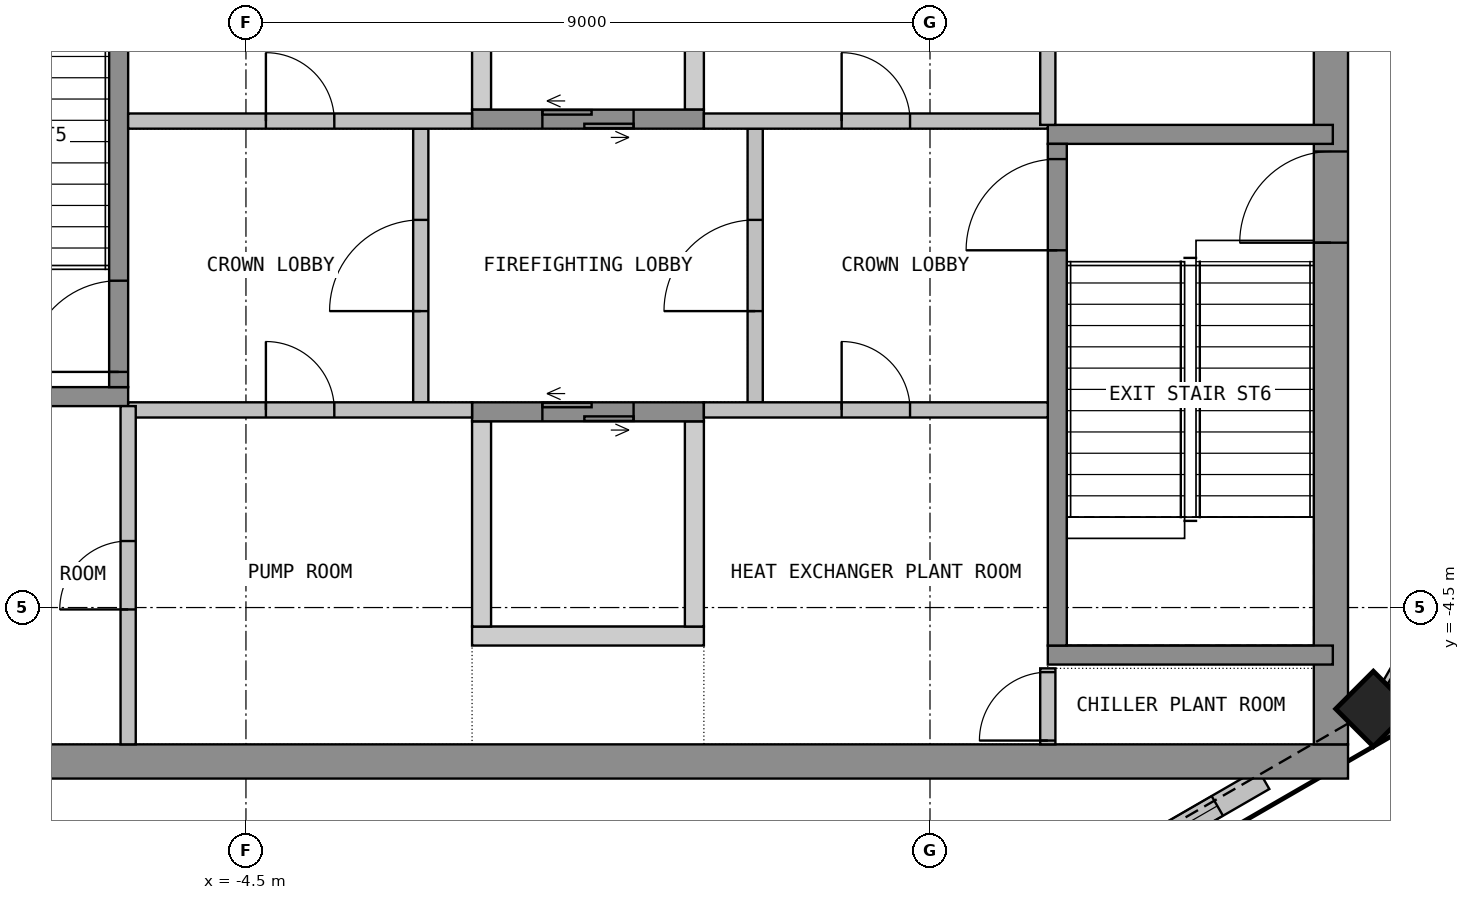
"""IFC4 building model, lengths in metres.
Left out: names, types, materials, properties, quantities, classifications, styles, units other than length and angle.
Written with IfcOpenShell. Run it as: python <this file> out.ifc"""

import sys

from ifc_helpers import new_model, si_unit, direction, frame, frame_2d, origin, origin_2d, place, context, subcontext, project, spatial, polyline, rectangle, outline, extrude, element, fill, save


model = new_model("IFC4")
c1 = context("Model", 3, precision=1e-05, world=origin(), true_north=direction((0.0, 1.0)))
c2 = subcontext(c1, "Body", "Model", "MODEL_VIEW")
j1 = project(units=[si_unit("LENGTHUNIT", "METRE"), si_unit("PLANEANGLEUNIT", "RADIAN")], contexts=[c1])
p1 = place(None, origin())
s1 = spatial("IfcSite", under=j1, at=p1, CompositionType="ELEMENT")
p2 = place(p1, origin())
s2 = spatial("IfcBuilding", under=s1, at=p2, CompositionType="ELEMENT")
p3 = place(p2, frame((0.0, 0.0, 336.9)))
s3 = spatial("IfcBuildingStorey", under=s2, at=p3, CompositionType="ELEMENT", Elevation=336.9)
p4 = place(p3, frame((10.333, -5.833, 0.0), z_axis=(0.0, 0.0, 1.0), x_axis=(0.707106781187, 0.707106781187, 0.0)))
e1 = element("IfcColumn", 1, at=p4, inside=s3, PredefinedType="COLUMN", context=c2, shape_type="SweptSolid", body=[
    extrude(rectangle(XDim=0.7, YDim=0.7, at=origin_2d()), origin(), (0.0, 0.0, 1.0), 3.9),
])
p5 = place(p3, frame((7.005, -7.846, 0.0), z_axis=(0.0, 0.0, 1.0), x_axis=(0.866060442015, 0.499939307093, 0.0)))
e2 = element("IfcWall", 2, at=p5, inside=s3, PredefinedType="SOLIDWALL", context=c2, shape_type="SweptSolid", body=[
    extrude(rectangle(XDim=2.177, YDim=0.3, at=frame_2d((1.088, 0.0))), origin(), (0.0, 0.0, 1.0), 3.0),
])
p6 = place(p5, frame((0.173, 0.0, 0.6)))
e3 = element("IfcOpeningElement", 3, at=p6, cuts=e2, PredefinedType="OPENING", context=c2, shape_type="SweptSolid", body=[
    extrude(rectangle(XDim=1.3, YDim=2.3, at=frame_2d((0.65, 1.15))), frame((0.0, 0.16, 0.0), z_axis=(0.0, -1.0, 0.0), x_axis=(1.0, 0.0, 0.0)), (0.0, 0.0, 1.0), 0.32),
])
p7 = place(p3, frame((10.592, -5.542, 0.0), z_axis=(0.0, 0.0, 1.0), x_axis=(0.499987607361, 0.86603255856, 0.0)))
e4 = element("IfcWall", 4, at=p7, inside=s3, PredefinedType="SOLIDWALL", context=c2, shape_type="SweptSolid", body=[
    extrude(rectangle(XDim=3.507, YDim=0.3, at=frame_2d((1.753, 0.0))), origin(), (0.0, 0.0, 1.0), 3.0),
])
p8 = place(p7, frame((0.553, 0.0, 0.6)))
e5 = element("IfcOpeningElement", 5, at=p8, cuts=e4, PredefinedType="OPENING", context=c2, shape_type="SweptSolid", body=[
    extrude(rectangle(XDim=2.4, YDim=2.3, at=frame_2d((1.2, 1.15))), frame((0.0, 0.16, 0.0), z_axis=(0.0, -1.0, 0.0), x_axis=(1.0, 0.0, 0.0)), (0.0, 0.0, 1.0), 0.32),
])
p9 = place(p3, frame((12.346, 2.505, 0.0), z_axis=(0.0, 0.0, 1.0), x_axis=(-0.499987607361, 0.86603255856, 0.0)))
e6 = element("IfcWall", 6, at=p9, inside=s3, PredefinedType="SOLIDWALL", context=c2, shape_type="SweptSolid", body=[
    extrude(rectangle(XDim=3.507, YDim=0.3, at=frame_2d((1.753, 0.0))), origin(), (0.0, 0.0, 1.0), 3.0),
])
p10 = place(p9, frame((0.553, 0.0, 0.6)))
e7 = element("IfcOpeningElement", 7, at=p10, cuts=e6, PredefinedType="OPENING", context=c2, shape_type="SweptSolid", body=[
    extrude(rectangle(XDim=2.4, YDim=2.3, at=frame_2d((1.2, 1.15))), frame((0.0, 0.16, 0.0), z_axis=(0.0, -1.0, 0.0), x_axis=(1.0, 0.0, 0.0)), (0.0, 0.0, 1.0), 0.32),
])
p11 = place(p3, frame((-8.89, -6.758, 0.0), z_axis=(0.0, 0.0, 1.0), x_axis=(0.866060442015, -0.499939307093, 0.0)))
e8 = element("IfcWall", 8, at=p11, inside=s3, PredefinedType="SOLIDWALL", context=c2, shape_type="SweptSolid", body=[
    extrude(rectangle(XDim=2.177, YDim=0.3, at=frame_2d((1.088, 0.0))), origin(), (0.0, 0.0, 1.0), 3.0),
])
p12 = place(p11, frame((0.704, 0.0, 0.6)))
e9 = element("IfcOpeningElement", 9, at=p12, cuts=e8, PredefinedType="OPENING", context=c2, shape_type="SweptSolid", body=[
    extrude(rectangle(XDim=1.3, YDim=2.3, at=frame_2d((0.65, 1.15))), frame((0.0, 0.16, 0.0), z_axis=(0.0, -1.0, 0.0), x_axis=(1.0, 0.0, 0.0)), (0.0, 0.0, 1.0), 0.32),
])
p13 = place(p3, frame((-10.0, -6.525, 0.0), z_axis=(0.0, 0.0, 1.0), x_axis=(1.0, 0.0, 0.0)))
e10 = element("IfcWall", 10, at=p13, inside=s3, PredefinedType="SHEAR", context=c2, shape_type="SweptSolid", body=[
    extrude(rectangle(XDim=20.0, YDim=0.45, at=frame_2d((10.0, 0.0))), origin(), (0.0, 0.0, 1.0), 3.9),
])
p14 = place(p3, frame((9.775, -6.3, 0.0), z_axis=(0.0, 0.0, 1.0), x_axis=(0.0, 1.0, 0.0)))
e11 = element("IfcWall", 11, at=p14, inside=s3, PredefinedType="SHEAR", context=c2, shape_type="SweptSolid", body=[
    extrude(rectangle(XDim=12.6, YDim=0.45, at=frame_2d((6.3, 0.0))), origin(), (0.0, 0.0, 1.0), 3.9),
])
p15 = place(p14, frame((6.6, 0.0, 0.0)))
e12 = element("IfcOpeningElement", 12, at=p15, cuts=e11, PredefinedType="OPENING", context=c2, shape_type="SweptSolid", body=[
    extrude(rectangle(XDim=1.2, YDim=2.1, at=frame_2d((0.6, 1.05))), frame((0.0, 0.235, 0.0), z_axis=(0.0, -1.0, 0.0), x_axis=(1.0, 0.0, 0.0)), (0.0, 0.0, 1.0), 0.47),
])
p16 = place(p3, origin())
e13 = element("IfcWall", 13, at=p16, inside=s3, PredefinedType="SHEAR", context=c2, shape_type="SweptSolid", body=[
    extrude(outline(polyline([(-1.525, 2.05), (-1.275, 2.05), (-1.275, 4.75), (-1.525, 4.75), (-1.525, 2.05)])), origin(), (0.0, 0.0, 1.0), 3.9),
])
p17 = place(p3, origin())
e14 = element("IfcWall", 14, at=p17, inside=s3, PredefinedType="SHEAR", context=c2, shape_type="SweptSolid", body=[
    extrude(outline(polyline([(1.275, 2.05), (1.525, 2.05), (1.525, 4.75), (1.275, 4.75), (1.275, 2.05)])), origin(), (0.0, 0.0, 1.0), 3.9),
])
p18 = place(p3, frame((-1.525, 1.925, 0.0), z_axis=(0.0, 0.0, 1.0), x_axis=(1.0, 0.0, 0.0)))
e15 = element("IfcWall", 15, at=p18, inside=s3, PredefinedType="SHEAR", context=c2, shape_type="SweptSolid", body=[
    extrude(rectangle(XDim=3.05, YDim=0.25, at=frame_2d((1.525, 0.0))), origin(), (0.0, 0.0, 1.0), 3.9),
])
p19 = place(p18, frame((0.925, 0.0, 0.0)))
e16 = element("IfcOpeningElement", 16, at=p19, cuts=e15, PredefinedType="OPENING", context=c2, shape_type="SweptSolid", body=[
    extrude(rectangle(XDim=1.2, YDim=2.1, at=frame_2d((0.6, 1.05))), frame((0.0, 0.135, 0.0), z_axis=(0.0, -1.0, 0.0), x_axis=(1.0, 0.0, 0.0)), (0.0, 0.0, 1.0), 0.27),
])
p20 = place(p3, origin())
e17 = element("IfcWall", 17, at=p20, inside=s3, PredefinedType="SHEAR", context=c2, shape_type="SweptSolid", body=[
    extrude(outline(polyline([(-1.525, -5.0), (1.525, -5.0), (1.525, -4.75), (-1.525, -4.75), (-1.525, -5.0)])), origin(), (0.0, 0.0, 1.0), 3.9),
])
p21 = place(p3, origin())
e18 = element("IfcWall", 18, at=p21, inside=s3, PredefinedType="SHEAR", context=c2, shape_type="SweptSolid", body=[
    extrude(outline(polyline([(-1.525, -4.75), (-1.275, -4.75), (-1.275, -2.05), (-1.525, -2.05), (-1.525, -4.75)])), origin(), (0.0, 0.0, 1.0), 3.9),
])
p22 = place(p3, origin())
e19 = element("IfcWall", 19, at=p22, inside=s3, PredefinedType="SHEAR", context=c2, shape_type="SweptSolid", body=[
    extrude(outline(polyline([(1.275, -4.75), (1.525, -4.75), (1.525, -2.05), (1.275, -2.05), (1.275, -4.75)])), origin(), (0.0, 0.0, 1.0), 3.9),
])
p23 = place(p3, frame((-1.525, -1.925, 0.0), z_axis=(0.0, 0.0, 1.0), x_axis=(1.0, 0.0, 0.0)))
e20 = element("IfcWall", 20, at=p23, inside=s3, PredefinedType="SHEAR", context=c2, shape_type="SweptSolid", body=[
    extrude(rectangle(XDim=3.05, YDim=0.25, at=frame_2d((1.525, 0.0))), origin(), (0.0, 0.0, 1.0), 3.9),
])
p24 = place(p23, frame((0.925, 0.0, 0.0)))
e21 = element("IfcOpeningElement", 21, at=p24, cuts=e20, PredefinedType="OPENING", context=c2, shape_type="SweptSolid", body=[
    extrude(rectangle(XDim=1.2, YDim=2.1, at=frame_2d((0.6, 1.05))), frame((0.0, 0.135, 0.0), z_axis=(0.0, -1.0, 0.0), x_axis=(1.0, 0.0, 0.0)), (0.0, 0.0, 1.0), 0.27),
])
p25 = place(p3, frame((-2.2, -1.8, 0.0), z_axis=(0.0, 0.0, 1.0), x_axis=(0.0, 1.0, 0.0)))
e22 = element("IfcWall", 22, at=p25, inside=s3, PredefinedType="PARTITIONING", context=c2, shape_type="SweptSolid", body=[
    extrude(rectangle(XDim=3.6, YDim=0.2, at=frame_2d((1.8, 0.0))), origin(), (0.0, 0.0, 1.0), 3.9),
])
p26 = place(p25, frame((1.2, 0.0, 0.0)))
e23 = element("IfcOpeningElement", 23, at=p26, cuts=e22, PredefinedType="OPENING", context=c2, shape_type="SweptSolid", body=[
    extrude(rectangle(XDim=1.2, YDim=2.1, at=frame_2d((0.6, 1.05))), frame((0.0, 0.11, 0.0), z_axis=(0.0, -1.0, 0.0), x_axis=(1.0, 0.0, 0.0)), (0.0, 0.0, 1.0), 0.22),
])
p27 = place(p3, frame((2.2, -1.8, 0.0), z_axis=(0.0, 0.0, 1.0), x_axis=(0.0, 1.0, 0.0)))
e24 = element("IfcWall", 24, at=p27, inside=s3, PredefinedType="PARTITIONING", context=c2, shape_type="SweptSolid", body=[
    extrude(rectangle(XDim=3.6, YDim=0.2, at=frame_2d((1.8, 0.0))), origin(), (0.0, 0.0, 1.0), 3.9),
])
p28 = place(p27, frame((1.2, 0.0, 0.0)))
e25 = element("IfcOpeningElement", 25, at=p28, cuts=e24, PredefinedType="OPENING", context=c2, shape_type="SweptSolid", body=[
    extrude(rectangle(XDim=1.2, YDim=2.1, at=frame_2d((0.6, 1.05))), frame((0.0, 0.11, 0.0), z_axis=(0.0, -1.0, 0.0), x_axis=(1.0, 0.0, 0.0)), (0.0, 0.0, 1.0), 0.22),
])
p29 = place(p3, frame((-9.8, -1.725, 0.0), z_axis=(0.0, 0.0, 1.0), x_axis=(1.0, 0.0, 0.0)))
e26 = element("IfcWall", 26, at=p29, inside=s3, PredefinedType="SHEAR", context=c2, shape_type="SweptSolid", body=[
    extrude(rectangle(XDim=3.75, YDim=0.25, at=frame_2d((1.875, 0.0))), origin(), (0.0, 0.0, 1.0), 3.9),
])
p30 = place(p3, frame((-6.175, -1.6, 0.0), z_axis=(0.0, 0.0, 1.0), x_axis=(0.0, 1.0, 0.0)))
e27 = element("IfcWall", 27, at=p30, inside=s3, PredefinedType="SHEAR", context=c2, shape_type="SweptSolid", body=[
    extrude(rectangle(XDim=6.6, YDim=0.25, at=frame_2d((3.3, 0.0))), origin(), (0.0, 0.0, 1.0), 3.9),
])
p31 = place(p30, frame((0.2, 0.0, 0.0)))
e28 = element("IfcOpeningElement", 28, at=p31, cuts=e27, PredefinedType="OPENING", context=c2, shape_type="SweptSolid", body=[
    extrude(rectangle(XDim=1.2, YDim=2.1, at=frame_2d((0.6, 1.05))), frame((0.0, 0.135, 0.0), z_axis=(0.0, -1.0, 0.0), x_axis=(1.0, 0.0, 0.0)), (0.0, 0.0, 1.0), 0.27),
])
for number, where, z_axis, x_axis in (
    (29, (6.05, -5.125, 0.0), (0.0, 0.0, 1.0), (1.0, 0.0, 0.0)),
    (30, (6.05, 1.725, 0.0), (0.0, 0.0, 1.0), (1.0, 0.0, 0.0)),
):
    element("IfcWall", number, at=place(p3, frame(where, z_axis=z_axis, x_axis=x_axis)), inside=s3, PredefinedType="SHEAR", context=c2, shape_type="SweptSolid", body=[
        extrude(rectangle(XDim=3.75, YDim=0.25, at=frame_2d((1.875, 0.0))), origin(), (0.0, 0.0, 1.0), 3.9),
    ])
p32 = place(p3, frame((6.175, -5.0, 0.0), z_axis=(0.0, 0.0, 1.0), x_axis=(0.0, 1.0, 0.0)))
e31 = element("IfcWall", 31, at=p32, inside=s3, PredefinedType="SHEAR", context=c2, shape_type="SweptSolid", body=[
    extrude(rectangle(XDim=6.6, YDim=0.25, at=frame_2d((3.3, 0.0))), origin(), (0.0, 0.0, 1.0), 3.9),
])
p33 = place(p32, frame((5.2, 0.0, 0.0)))
e32 = element("IfcOpeningElement", 32, at=p33, cuts=e31, PredefinedType="OPENING", context=c2, shape_type="SweptSolid", body=[
    extrude(rectangle(XDim=1.2, YDim=2.1, at=frame_2d((0.6, 1.05))), frame((0.0, 0.135, 0.0), z_axis=(0.0, -1.0, 0.0), x_axis=(1.0, 0.0, 0.0)), (0.0, 0.0, 1.0), 0.27),
])
p34 = place(p3, frame((-6.05, 1.9, 0.0), z_axis=(0.0, 0.0, 1.0), x_axis=(1.0, 0.0, 0.0)))
e33 = element("IfcWall", 33, at=p34, inside=s3, PredefinedType="PARTITIONING", context=c2, shape_type="SweptSolid", body=[
    extrude(rectangle(XDim=4.525, YDim=0.2, at=frame_2d((2.263, 0.0))), origin(), (0.0, 0.0, 1.0), 3.9),
])
p35 = place(p34, frame((1.812, 0.0, 0.0)))
e34 = element("IfcOpeningElement", 34, at=p35, cuts=e33, PredefinedType="OPENING", context=c2, shape_type="SweptSolid", body=[
    extrude(rectangle(XDim=0.9, YDim=2.1, at=frame_2d((0.45, 1.05))), frame((0.0, 0.11, 0.0), z_axis=(0.0, -1.0, 0.0), x_axis=(1.0, 0.0, 0.0)), (0.0, 0.0, 1.0), 0.22),
])
p36 = place(p3, frame((-6.05, -1.9, 0.0), z_axis=(0.0, 0.0, 1.0), x_axis=(1.0, 0.0, 0.0)))
e35 = element("IfcWall", 35, at=p36, inside=s3, PredefinedType="PARTITIONING", context=c2, shape_type="SweptSolid", body=[
    extrude(rectangle(XDim=4.525, YDim=0.2, at=frame_2d((2.263, 0.0))), origin(), (0.0, 0.0, 1.0), 3.9),
])
p37 = place(p36, frame((1.812, 0.0, 0.0)))
e36 = element("IfcOpeningElement", 36, at=p37, cuts=e35, PredefinedType="OPENING", context=c2, shape_type="SweptSolid", body=[
    extrude(rectangle(XDim=0.9, YDim=2.1, at=frame_2d((0.45, 1.05))), frame((0.0, 0.11, 0.0), z_axis=(0.0, -1.0, 0.0), x_axis=(1.0, 0.0, 0.0)), (0.0, 0.0, 1.0), 0.22),
])
p38 = place(p3, frame((1.525, 1.9, 0.0), z_axis=(0.0, 0.0, 1.0), x_axis=(1.0, 0.0, 0.0)))
e37 = element("IfcWall", 37, at=p38, inside=s3, PredefinedType="PARTITIONING", context=c2, shape_type="SweptSolid", body=[
    extrude(rectangle(XDim=4.525, YDim=0.2, at=frame_2d((2.263, 0.0))), origin(), (0.0, 0.0, 1.0), 3.9),
])
p39 = place(p38, frame((1.812, 0.0, 0.0)))
e38 = element("IfcOpeningElement", 38, at=p39, cuts=e37, PredefinedType="OPENING", context=c2, shape_type="SweptSolid", body=[
    extrude(rectangle(XDim=0.9, YDim=2.1, at=frame_2d((0.45, 1.05))), frame((0.0, 0.11, 0.0), z_axis=(0.0, -1.0, 0.0), x_axis=(1.0, 0.0, 0.0)), (0.0, 0.0, 1.0), 0.22),
])
p40 = place(p3, frame((1.525, -1.9, 0.0), z_axis=(0.0, 0.0, 1.0), x_axis=(1.0, 0.0, 0.0)))
e39 = element("IfcWall", 39, at=p40, inside=s3, PredefinedType="PARTITIONING", context=c2, shape_type="SweptSolid", body=[
    extrude(rectangle(XDim=4.525, YDim=0.2, at=frame_2d((2.263, 0.0))), origin(), (0.0, 0.0, 1.0), 3.9),
])
p41 = place(p40, frame((1.812, 0.0, 0.0)))
e40 = element("IfcOpeningElement", 40, at=p41, cuts=e39, PredefinedType="OPENING", context=c2, shape_type="SweptSolid", body=[
    extrude(rectangle(XDim=0.9, YDim=2.1, at=frame_2d((0.45, 1.05))), frame((0.0, 0.11, 0.0), z_axis=(0.0, -1.0, 0.0), x_axis=(1.0, 0.0, 0.0)), (0.0, 0.0, 1.0), 0.22),
])
p42 = place(p3, frame((-6.05, -6.3, 0.0), z_axis=(0.0, 0.0, 1.0), x_axis=(0.0, 1.0, 0.0)))
e41 = element("IfcWall", 41, at=p42, inside=s3, PredefinedType="PARTITIONING", context=c2, shape_type="SweptSolid", body=[
    extrude(rectangle(XDim=4.45, YDim=0.2, at=frame_2d((2.225, 0.0))), origin(), (0.0, 0.0, 1.0), 3.9),
])
p43 = place(p42, frame((1.775, 0.0, 0.0)))
e42 = element("IfcOpeningElement", 42, at=p43, cuts=e41, PredefinedType="OPENING", context=c2, shape_type="SweptSolid", body=[
    extrude(rectangle(XDim=0.9, YDim=2.1, at=frame_2d((0.45, 1.05))), frame((0.0, 0.11, 0.0), z_axis=(0.0, -1.0, 0.0), x_axis=(1.0, 0.0, 0.0)), (0.0, 0.0, 1.0), 0.22),
])
p44 = place(p3, frame((6.05, 1.85, 0.0), z_axis=(0.0, 0.0, 1.0), x_axis=(0.0, 1.0, 0.0)))
e43 = element("IfcWall", 43, at=p44, inside=s3, PredefinedType="PARTITIONING", context=c2, shape_type="SweptSolid", body=[
    extrude(rectangle(XDim=4.45, YDim=0.2, at=frame_2d((2.225, 0.0))), origin(), (0.0, 0.0, 1.0), 3.9),
])
p45 = place(p44, frame((1.775, 0.0, 0.0)))
e44 = element("IfcOpeningElement", 44, at=p45, cuts=e43, PredefinedType="OPENING", context=c2, shape_type="SweptSolid", body=[
    extrude(rectangle(XDim=0.9, YDim=2.1, at=frame_2d((0.45, 1.05))), frame((0.0, 0.11, 0.0), z_axis=(0.0, -1.0, 0.0), x_axis=(1.0, 0.0, 0.0)), (0.0, 0.0, 1.0), 0.22),
])
p46 = place(p3, frame((6.05, -6.3, 0.0), z_axis=(0.0, 0.0, 1.0), x_axis=(0.0, 1.0, 0.0)))
e45 = element("IfcWall", 45, at=p46, inside=s3, PredefinedType="PARTITIONING", context=c2, shape_type="SweptSolid", body=[
    extrude(rectangle(XDim=1.0, YDim=0.2, at=frame_2d((0.5, 0.0))), origin(), (0.0, 0.0, 1.0), 3.9),
])
p47 = place(p46, frame((0.05, 0.0, 0.0)))
e46 = element("IfcOpeningElement", 46, at=p47, cuts=e45, PredefinedType="OPENING", context=c2, shape_type="SweptSolid", body=[
    extrude(rectangle(XDim=0.9, YDim=2.1, at=frame_2d((0.45, 1.05))), frame((0.0, 0.11, 0.0), z_axis=(0.0, -1.0, 0.0), x_axis=(1.0, 0.0, 0.0)), (0.0, 0.0, 1.0), 0.22),
])
p48 = place(p6, origin())
e47 = element("IfcWindow", 47, at=p48, inside=s3, PartitioningType="SINGLE_PANEL", PredefinedType="WINDOW", context=c2, shape_type="SweptSolid", body=[
    extrude(rectangle(XDim=1.3, YDim=2.3, at=frame_2d((0.65, 1.15))), frame((0.0, 0.03, 0.0), z_axis=(0.0, -1.0, 0.0), x_axis=(1.0, 0.0, 0.0)), (0.0, 0.0, 1.0), 0.06),
])
fill(e3, e47)
p49 = place(p15, origin())
e48 = element("IfcDoor", 48, at=p49, inside=s3, OperationType="SINGLE_SWING_RIGHT", PredefinedType="DOOR", context=c2, shape_type="SweptSolid", body=[
    extrude(rectangle(XDim=1.2, YDim=2.1, at=frame_2d((0.6, 1.05))), frame((0.0, 0.025, 0.0), z_axis=(0.0, -1.0, 0.0), x_axis=(1.0, 0.0, 0.0)), (0.0, 0.0, 1.0), 0.05),
])
fill(e12, e48)
p50 = place(p19, origin())
e49 = element("IfcDoor", 49, at=p50, inside=s3, OperationType="DOUBLE_DOOR_SLIDING", PredefinedType="DOOR", context=c2, shape_type="SweptSolid", body=[
    extrude(rectangle(XDim=1.2, YDim=2.1, at=frame_2d((0.6, 1.05))), frame((0.0, 0.025, 0.0), z_axis=(0.0, -1.0, 0.0), x_axis=(1.0, 0.0, 0.0)), (0.0, 0.0, 1.0), 0.05),
])
fill(e16, e49)
p51 = place(p24, origin())
e50 = element("IfcDoor", 50, at=p51, inside=s3, OperationType="DOUBLE_DOOR_SLIDING", PredefinedType="DOOR", context=c2, shape_type="SweptSolid", body=[
    extrude(rectangle(XDim=1.2, YDim=2.1, at=frame_2d((0.6, 1.05))), frame((0.0, 0.025, 0.0), z_axis=(0.0, -1.0, 0.0), x_axis=(1.0, 0.0, 0.0)), (0.0, 0.0, 1.0), 0.05),
])
fill(e21, e50)
p52 = place(p26, origin())
e51 = element("IfcDoor", 51, at=p52, inside=s3, OperationType="SINGLE_SWING_LEFT", PredefinedType="DOOR", context=c2, shape_type="SweptSolid", body=[
    extrude(rectangle(XDim=1.2, YDim=2.1, at=frame_2d((0.6, 1.05))), frame((0.0, 0.025, 0.0), z_axis=(0.0, -1.0, 0.0), x_axis=(1.0, 0.0, 0.0)), (0.0, 0.0, 1.0), 0.05),
])
fill(e23, e51)
p53 = place(p28, origin())
e52 = element("IfcDoor", 52, at=p53, inside=s3, OperationType="SINGLE_SWING_LEFT", PredefinedType="DOOR", context=c2, shape_type="SweptSolid", body=[
    extrude(rectangle(XDim=1.2, YDim=2.1, at=frame_2d((0.6, 1.05))), frame((0.0, 0.025, 0.0), z_axis=(0.0, -1.0, 0.0), x_axis=(1.0, 0.0, 0.0)), (0.0, 0.0, 1.0), 0.05),
])
fill(e25, e52)
p54 = place(p31, origin())
e53 = element("IfcDoor", 53, at=p54, inside=s3, OperationType="SINGLE_SWING_LEFT", PredefinedType="DOOR", context=c2, shape_type="SweptSolid", body=[
    extrude(rectangle(XDim=1.2, YDim=2.1, at=frame_2d((0.6, 1.05))), frame((0.0, 0.025, 0.0), z_axis=(0.0, -1.0, 0.0), x_axis=(1.0, 0.0, 0.0)), (0.0, 0.0, 1.0), 0.05),
])
fill(e28, e53)
p55 = place(p33, origin())
e54 = element("IfcDoor", 54, at=p55, inside=s3, OperationType="SINGLE_SWING_LEFT", PredefinedType="DOOR", context=c2, shape_type="SweptSolid", body=[
    extrude(rectangle(XDim=1.2, YDim=2.1, at=frame_2d((0.6, 1.05))), frame((0.0, 0.025, 0.0), z_axis=(0.0, -1.0, 0.0), x_axis=(1.0, 0.0, 0.0)), (0.0, 0.0, 1.0), 0.05),
])
fill(e32, e54)
p56 = place(p35, origin())
e55 = element("IfcDoor", 55, at=p56, inside=s3, OperationType="SINGLE_SWING_LEFT", PredefinedType="DOOR", context=c2, shape_type="SweptSolid", body=[
    extrude(rectangle(XDim=0.9, YDim=2.1, at=frame_2d((0.45, 1.05))), frame((0.0, 0.025, 0.0), z_axis=(0.0, -1.0, 0.0), x_axis=(1.0, 0.0, 0.0)), (0.0, 0.0, 1.0), 0.05),
])
fill(e34, e55)
p57 = place(p37, origin())
e56 = element("IfcDoor", 56, at=p57, inside=s3, OperationType="SINGLE_SWING_LEFT", PredefinedType="DOOR", context=c2, shape_type="SweptSolid", body=[
    extrude(rectangle(XDim=0.9, YDim=2.1, at=frame_2d((0.45, 1.05))), frame((0.0, 0.025, 0.0), z_axis=(0.0, -1.0, 0.0), x_axis=(1.0, 0.0, 0.0)), (0.0, 0.0, 1.0), 0.05),
])
fill(e36, e56)
p58 = place(p39, origin())
e57 = element("IfcDoor", 57, at=p58, inside=s3, OperationType="SINGLE_SWING_LEFT", PredefinedType="DOOR", context=c2, shape_type="SweptSolid", body=[
    extrude(rectangle(XDim=0.9, YDim=2.1, at=frame_2d((0.45, 1.05))), frame((0.0, 0.025, 0.0), z_axis=(0.0, -1.0, 0.0), x_axis=(1.0, 0.0, 0.0)), (0.0, 0.0, 1.0), 0.05),
])
fill(e38, e57)
p59 = place(p41, origin())
e58 = element("IfcDoor", 58, at=p59, inside=s3, OperationType="SINGLE_SWING_LEFT", PredefinedType="DOOR", context=c2, shape_type="SweptSolid", body=[
    extrude(rectangle(XDim=0.9, YDim=2.1, at=frame_2d((0.45, 1.05))), frame((0.0, 0.025, 0.0), z_axis=(0.0, -1.0, 0.0), x_axis=(1.0, 0.0, 0.0)), (0.0, 0.0, 1.0), 0.05),
])
fill(e40, e58)
p60 = place(p43, origin())
e59 = element("IfcDoor", 59, at=p60, inside=s3, OperationType="SINGLE_SWING_LEFT", PredefinedType="DOOR", context=c2, shape_type="SweptSolid", body=[
    extrude(rectangle(XDim=0.9, YDim=2.1, at=frame_2d((0.45, 1.05))), frame((0.0, 0.025, 0.0), z_axis=(0.0, -1.0, 0.0), x_axis=(1.0, 0.0, 0.0)), (0.0, 0.0, 1.0), 0.05),
])
fill(e42, e59)
p61 = place(p47, origin())
e60 = element("IfcDoor", 60, at=p61, inside=s3, OperationType="SINGLE_SWING_LEFT", PredefinedType="DOOR", context=c2, shape_type="SweptSolid", body=[
    extrude(rectangle(XDim=0.9, YDim=2.1, at=frame_2d((0.45, 1.05))), frame((0.0, 0.025, 0.0), z_axis=(0.0, -1.0, 0.0), x_axis=(1.0, 0.0, 0.0)), (0.0, 0.0, 1.0), 0.05),
])
fill(e46, e60)
save(model, sys.argv[1])
